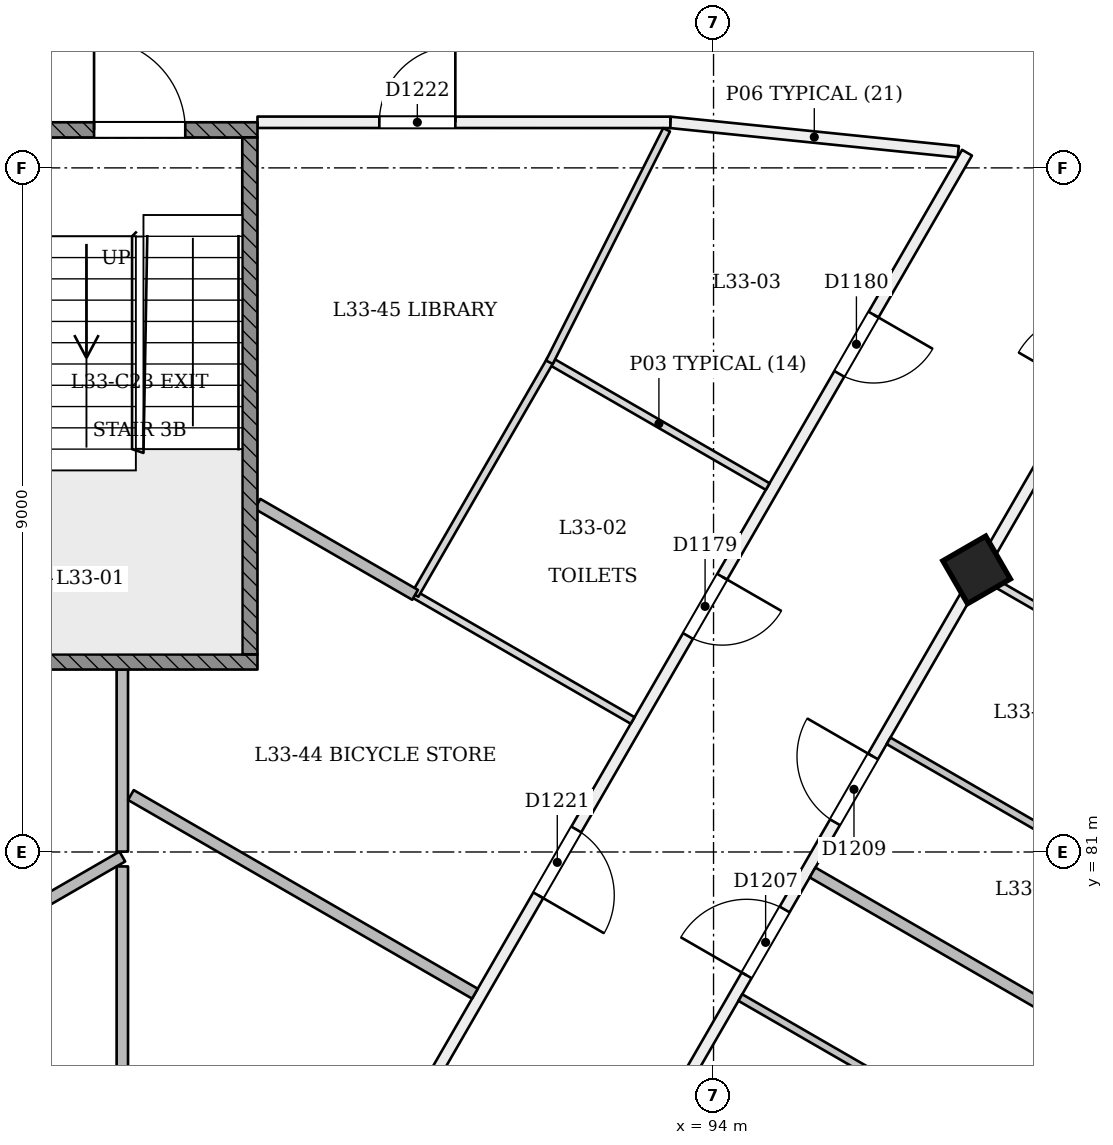
"""IFC4 building model, lengths in metres.
Left out: names, types, materials, properties, quantities, classifications, styles, units other than length and angle.
Written with IfcOpenShell. Run it as: python <this file> out.ifc"""

import sys

from ifc_helpers import new_model, si_unit, direction, frame, frame_2d, origin, origin_2d, place, context, subcontext, project, spatial, rectangle, extrude, element, fill, save


model = new_model("IFC4")
c1 = context("Model", 3, precision=1e-05, world=origin(), true_north=direction((0.0, 1.0)))
c2 = subcontext(c1, "Body", "Model", "MODEL_VIEW")
j1 = project(units=[si_unit("LENGTHUNIT", "METRE"), si_unit("PLANEANGLEUNIT", "RADIAN")], contexts=[c1])
p1 = place(None, origin())
s1 = spatial("IfcSite", under=j1, at=p1, CompositionType="ELEMENT")
p2 = place(p1, origin())
s2 = spatial("IfcBuilding", under=s1, at=p2, CompositionType="ELEMENT")
p3 = place(p2, frame((0.0, 0.0, 131.4)))
s3 = spatial("IfcBuildingStorey", under=s2, at=p3, CompositionType="ELEMENT", Elevation=131.4)
p4 = place(p3, frame((97.488, 84.664, -0.02), z_axis=(-0.02215519141, 0.038415882353, 0.999016199807), x_axis=(-0.500652777817, -0.865364161883, 0.022173483991)))
e1 = element("IfcColumn", 1, at=p4, inside=s3, PredefinedType="COLUMN", context=c2, shape_type="SweptSolid", body=[
    extrude(rectangle(XDim=0.65, YDim=0.65, at=origin_2d()), origin(), (0.0, 0.0, 1.0), 3.604),
])
p5 = place(p3, frame((93.431, 90.599, 0.0), z_axis=(0.0, 0.0, 1.0), x_axis=(0.994809932393, -0.101750667872, 0.0)))
e2 = element("IfcWall", 2, at=p5, inside=s3, PredefinedType="PARTITIONING", context=c2, shape_type="SweptSolid", body=[
    extrude(rectangle(XDim=3.808, YDim=0.15, at=frame_2d((1.904, 0.0))), origin(), (0.0, 0.0, 1.0), 3.15),
])
p6 = place(p3, frame((85.131, 63.263, 0.0), z_axis=(0.0, 0.0, 1.0), x_axis=(0.500002881847, 0.866023739943, 0.0)))
e3 = element("IfcWall", 3, at=p6, inside=s3, PredefinedType="PARTITIONING", context=c2, shape_type="SweptSolid", body=[
    extrude(rectangle(XDim=34.013, YDim=0.15, at=frame_2d((17.006, 0.0))), origin(), (0.0, 0.0, 1.0), 2.75),
])
p7 = place(p6, frame((0.351, 0.0, 0.0)))
e4 = element("IfcOpeningElement", 4, at=p7, cuts=e3, PredefinedType="OPENING", context=c2, shape_type="SweptSolid", body=[
    extrude(rectangle(XDim=1.2, YDim=2.1, at=frame_2d((0.6, 1.05))), frame((0.0, 0.085, 0.0), z_axis=(0.0, -1.0, 0.0), x_axis=(1.0, 0.0, 0.0)), (0.0, 0.0, 1.0), 0.171),
])
p8 = place(p6, frame((3.963, 0.0, 0.0)))
e5 = element("IfcOpeningElement", 5, at=p8, cuts=e3, PredefinedType="OPENING", context=c2, shape_type="SweptSolid", body=[
    extrude(rectangle(XDim=1.0, YDim=2.1, at=frame_2d((0.5, 1.05))), frame((0.0, 0.085, 0.0), z_axis=(0.0, -1.0, 0.0), x_axis=(1.0, 0.0, 0.0)), (0.0, 0.0, 1.0), 0.171),
])
p9 = place(p6, frame((9.493, 0.0, 0.0)))
e6 = element("IfcOpeningElement", 6, at=p9, cuts=e3, PredefinedType="OPENING", context=c2, shape_type="SweptSolid", body=[
    extrude(rectangle(XDim=1.0, YDim=2.1, at=frame_2d((0.5, 1.05))), frame((0.0, 0.085, 0.0), z_axis=(0.0, -1.0, 0.0), x_axis=(1.0, 0.0, 0.0)), (0.0, 0.0, 1.0), 0.171),
])
p10 = place(p6, frame((11.818, 0.0, 0.0)))
e7 = element("IfcOpeningElement", 7, at=p10, cuts=e3, PredefinedType="OPENING", context=c2, shape_type="SweptSolid", body=[
    extrude(rectangle(XDim=1.0, YDim=2.1, at=frame_2d((0.5, 1.05))), frame((0.0, 0.085, 0.0), z_axis=(0.0, -1.0, 0.0), x_axis=(1.0, 0.0, 0.0)), (0.0, 0.0, 1.0), 0.171),
])
p11 = place(p6, frame((18.608, 0.0, 0.0)))
e8 = element("IfcOpeningElement", 8, at=p11, cuts=e3, PredefinedType="OPENING", context=c2, shape_type="SweptSolid", body=[
    extrude(rectangle(XDim=1.0, YDim=2.1, at=frame_2d((0.5, 1.05))), frame((0.0, 0.085, 0.0), z_axis=(0.0, -1.0, 0.0), x_axis=(1.0, 0.0, 0.0)), (0.0, 0.0, 1.0), 0.171),
])
p12 = place(p6, frame((20.933, 0.0, 0.0)))
e9 = element("IfcOpeningElement", 9, at=p12, cuts=e3, PredefinedType="OPENING", context=c2, shape_type="SweptSolid", body=[
    extrude(rectangle(XDim=1.0, YDim=2.1, at=frame_2d((0.5, 1.05))), frame((0.0, 0.085, 0.0), z_axis=(0.0, -1.0, 0.0), x_axis=(1.0, 0.0, 0.0)), (0.0, 0.0, 1.0), 0.171),
])
p13 = place(p6, frame((27.493, 0.0, 0.0)))
e10 = element("IfcOpeningElement", 10, at=p13, cuts=e3, PredefinedType="OPENING", context=c2, shape_type="SweptSolid", body=[
    extrude(rectangle(XDim=1.0, YDim=2.1, at=frame_2d((0.5, 1.05))), frame((0.0, 0.085, 0.0), z_axis=(0.0, -1.0, 0.0), x_axis=(1.0, 0.0, 0.0)), (0.0, 0.0, 1.0), 0.171),
])
p14 = place(p6, frame((29.933, 0.0, 0.0)))
e11 = element("IfcOpeningElement", 11, at=p14, cuts=e3, PredefinedType="OPENING", context=c2, shape_type="SweptSolid", body=[
    extrude(rectangle(XDim=1.0, YDim=2.1, at=frame_2d((0.5, 1.05))), frame((0.0, 0.085, 0.0), z_axis=(0.0, -1.0, 0.0), x_axis=(1.0, 0.0, 0.0)), (0.0, 0.0, 1.0), 0.171),
])
p15 = place(p3, frame((97.335, 90.2, 0.0), z_axis=(0.0, 0.0, 1.0), x_axis=(-0.500002918398, -0.86602371884, 0.0)))
e12 = element("IfcWall", 12, at=p15, inside=s3, PredefinedType="PARTITIONING", context=c2, shape_type="SweptSolid", body=[
    extrude(rectangle(XDim=24.539, YDim=0.15, at=frame_2d((12.27, 0.0))), origin(), (0.0, 0.0, 1.0), 3.15),
])
p16 = place(p15, frame((6.442, 0.0, 0.0)))
e13 = element("IfcOpeningElement", 13, at=p16, cuts=e12, PredefinedType="OPENING", context=c2, shape_type="SweptSolid", body=[
    extrude(rectangle(XDim=0.9, YDim=2.1, at=frame_2d((0.45, 1.05))), frame((0.0, 0.085, 0.0), z_axis=(0.0, -1.0, 0.0), x_axis=(1.0, 0.0, 0.0)), (0.0, 0.0, 1.0), 0.171),
])
p17 = place(p15, frame((2.46, 0.0, 0.0)))
e14 = element("IfcOpeningElement", 14, at=p17, cuts=e12, PredefinedType="OPENING", context=c2, shape_type="SweptSolid", body=[
    extrude(rectangle(XDim=0.9, YDim=2.1, at=frame_2d((0.45, 1.05))), frame((0.0, 0.085, 0.0), z_axis=(0.0, -1.0, 0.0), x_axis=(1.0, 0.0, 0.0)), (0.0, 0.0, 1.0), 0.171),
])
p18 = place(p15, frame((15.454, 0.0, 0.0)))
e15 = element("IfcOpeningElement", 15, at=p18, cuts=e12, PredefinedType="OPENING", context=c2, shape_type="SweptSolid", body=[
    extrude(rectangle(XDim=1.0, YDim=2.1, at=frame_2d((0.5, 1.05))), frame((0.0, 0.085, 0.0), z_axis=(0.0, -1.0, 0.0), x_axis=(1.0, 0.0, 0.0)), (0.0, 0.0, 1.0), 0.171),
])
p19 = place(p15, frame((10.281, 0.0, 0.0)))
e16 = element("IfcOpeningElement", 16, at=p19, cuts=e12, PredefinedType="OPENING", context=c2, shape_type="SweptSolid", body=[
    extrude(rectangle(XDim=1.0, YDim=2.1, at=frame_2d((0.5, 1.05))), frame((0.0, 0.085, 0.0), z_axis=(0.0, -1.0, 0.0), x_axis=(1.0, 0.0, 0.0)), (0.0, 0.0, 1.0), 0.171),
])
p20 = place(p3, frame((88.0, 90.6, 0.0), z_axis=(0.0, 0.0, 1.0), x_axis=(0.999999983836, -0.000179799521, 0.0)))
e17 = element("IfcWall", 17, at=p20, inside=s3, PredefinedType="PARTITIONING", context=c2, shape_type="SweptSolid", body=[
    extrude(rectangle(XDim=5.431, YDim=0.15, at=frame_2d((2.716, 0.0))), origin(), (0.0, 0.0, 1.0), 3.15),
])
p21 = place(p20, frame((1.603, 0.0, 0.0)))
e18 = element("IfcOpeningElement", 18, at=p21, cuts=e17, PredefinedType="OPENING", context=c2, shape_type="SweptSolid", body=[
    extrude(rectangle(XDim=1.0, YDim=2.1, at=frame_2d((0.5, 1.05))), frame((0.0, 0.085, 0.0), z_axis=(0.0, -1.0, 0.0), x_axis=(1.0, 0.0, 0.0)), (0.0, 0.0, 1.0), 0.171),
])
p22 = place(p3, frame((94.712, 85.808, 0.0), z_axis=(0.0, 0.0, 1.0), x_axis=(-0.866034271106, 0.499984641034, 0.0)))
e19 = element("IfcWall", 19, at=p22, inside=s3, PredefinedType="PARTITIONING", context=c2, shape_type="SweptSolid", body=[
    extrude(rectangle(XDim=3.305, YDim=0.1, at=frame_2d((1.652, 0.0))), origin(), (0.0, 0.0, 1.0), 3.15),
])
p23 = place(p3, frame((90.056, 84.393, 0.0), z_axis=(0.0, 0.0, 1.0), x_axis=(0.866002163101, -0.500040251884, 0.0)))
e20 = element("IfcWall", 20, at=p23, inside=s3, PredefinedType="PARTITIONING", context=c2, shape_type="SweptSolid", body=[
    extrude(rectangle(XDim=3.325, YDim=0.1, at=frame_2d((1.663, 0.0))), origin(), (0.0, 0.0, 1.0), 3.15),
])
p24 = place(p3, frame((91.859, 87.478, 0.0), z_axis=(0.0, 0.0, 1.0), x_axis=(-0.499740198564, -0.866175348263, 0.0)))
e21 = element("IfcWall", 21, at=p24, inside=s3, PredefinedType="PARTITIONING", context=c2, shape_type="SweptSolid", body=[
    extrude(rectangle(XDim=3.573, YDim=0.1, at=frame_2d((1.787, 0.0))), origin(), (0.0, 0.0, 1.0), 3.15),
])
p25 = place(p3, frame((93.382, 90.501, 0.0), z_axis=(0.0, 0.0, 1.0), x_axis=(-0.450176199903, -0.89293974547, 0.0)))
e22 = element("IfcWall", 22, at=p25, inside=s3, PredefinedType="PARTITIONING", context=c2, shape_type="SweptSolid", body=[
    extrude(rectangle(XDim=3.425, YDim=0.1, at=frame_2d((1.713, 0.0))), origin(), (0.0, 0.0, 1.0), 3.15),
])
p26 = place(p3, frame((94.353, 79.085, 0.0), z_axis=(0.0, 0.0, 1.0), x_axis=(0.86601045545, -0.500025890382, 0.0)))
e23 = element("IfcWall", 23, at=p26, inside=s3, PredefinedType="PARTITIONING", context=c2, shape_type="SweptSolid", body=[
    extrude(rectangle(XDim=2.925, YDim=0.1, at=frame_2d((1.462, 0.0))), origin(), (0.0, 0.0, 1.0), 3.15),
])
p27 = place(p3, frame((100.798, 77.558, 0.0), z_axis=(0.0, 0.0, 1.0), x_axis=(-0.866025401434, 0.500000004071, 0.0)))
e24 = element("IfcWall", 24, at=p27, inside=s3, PredefinedType="PARTITIONING", context=c2, shape_type="SweptSolid", body=[
    extrude(rectangle(XDim=6.345, YDim=0.15, at=frame_2d((3.173, 0.0))), origin(), (0.0, 0.0, 1.0), 2.65),
])
p28 = place(p3, frame((98.749, 81.05, 0.0), z_axis=(0.0, 0.0, 1.0), x_axis=(-0.865989837833, 0.500061596976, 0.0)))
e25 = element("IfcWall", 25, at=p28, inside=s3, PredefinedType="PARTITIONING", context=c2, shape_type="SweptSolid", body=[
    extrude(rectangle(XDim=2.825, YDim=0.1, at=frame_2d((1.413, 0.0))), origin(), (0.0, 0.0, 1.0), 3.15),
])
p29 = place(p3, frame((99.956, 83.24, 0.0), z_axis=(0.0, 0.0, 1.0), x_axis=(-0.866020020486, 0.50000932403, 0.0)))
e26 = element("IfcWall", 26, at=p29, inside=s3, PredefinedType="PARTITIONING", context=c2, shape_type="SweptSolid", body=[
    extrude(rectangle(XDim=2.775, YDim=0.1, at=frame_2d((1.387, 0.0))), origin(), (0.0, 0.0, 1.0), 2.75),
])
p30 = place(p3, frame((80.129, 77.422, 0.0), z_axis=(0.0, 0.0, 1.0), x_axis=(0.866030712881, 0.499990804263, 0.0)))
e27 = element("IfcWall", 27, at=p30, inside=s3, PredefinedType="PARTITIONING", context=c2, shape_type="SweptSolid", body=[
    extrude(rectangle(XDim=7.035, YDim=0.15, at=frame_2d((3.518, 0.0))), origin(), (0.0, 0.0, 1.0), 3.15),
])
p31 = place(p3, frame((86.222, 81.005, 0.0), z_axis=(0.0, 0.0, 1.0), x_axis=(0.0, 1.0, 0.0)))
e28 = element("IfcWall", 28, at=p31, inside=s3, PredefinedType="PARTITIONING", context=c2, shape_type="SweptSolid", body=[
    extrude(rectangle(XDim=2.395, YDim=0.15, at=frame_2d((1.198, 0.0))), origin(), (0.0, 0.0, 1.0), 3.15),
])
p32 = place(p3, frame((86.222, 80.81, 0.0), z_axis=(0.0, 0.0, 1.0), x_axis=(0.0, -1.0, 0.0)))
e29 = element("IfcWall", 29, at=p32, inside=s3, PredefinedType="PARTITIONING", context=c2, shape_type="SweptSolid", body=[
    extrude(rectangle(XDim=4.734, YDim=0.15, at=frame_2d((2.367, 0.0))), origin(), (0.0, 0.0, 1.0), 3.15),
])
p33 = place(p3, frame((90.86, 79.136, 0.0), z_axis=(0.0, 0.0, 1.0), x_axis=(-0.866023771128, 0.500002827834, 0.0)))
e30 = element("IfcWall", 30, at=p33, inside=s3, PredefinedType="PARTITIONING", context=c2, shape_type="SweptSolid", body=[
    extrude(rectangle(XDim=5.226, YDim=0.15, at=frame_2d((2.613, 0.0))), origin(), (0.0, 0.0, 1.0), 3.15),
])
p34 = place(p3, frame((90.073, 84.383, 0.0), z_axis=(0.0, 0.0, 1.0), x_axis=(-0.866044647487, 0.499966667447, 0.0)))
e31 = element("IfcWall", 31, at=p34, inside=s3, PredefinedType="PARTITIONING", context=c2, shape_type="SweptSolid", body=[
    extrude(rectangle(XDim=2.394, YDim=0.15, at=frame_2d((1.197, 0.0))), origin(), (0.0, 0.0, 1.0), 3.15),
])
p35 = place(p3, frame((82.0, 90.5, 0.0), z_axis=(0.0, 0.0, 1.0), x_axis=(1.0, 0.0, 0.0)))
e32 = element("IfcWall", 32, at=p35, inside=s3, PredefinedType="SOLIDWALL", context=c2, shape_type="SweptSolid", body=[
    extrude(rectangle(XDim=6.0, YDim=0.2, at=frame_2d((3.0, 0.0))), origin(), (0.0, 0.0, 1.0), 3.15),
])
p36 = place(p35, frame((0.95, 0.0, 0.0)))
e33 = element("IfcOpeningElement", 33, at=p36, cuts=e32, PredefinedType="OPENING", context=c2, shape_type="SweptSolid", body=[
    extrude(rectangle(XDim=1.2, YDim=2.1, at=frame_2d((0.6, 1.05))), frame((0.0, 0.11, 0.0), z_axis=(0.0, -1.0, 0.0), x_axis=(1.0, 0.0, 0.0)), (0.0, 0.0, 1.0), 0.221),
])
p37 = place(p35, frame((3.85, 0.0, 0.0)))
e34 = element("IfcOpeningElement", 34, at=p37, cuts=e32, PredefinedType="OPENING", context=c2, shape_type="SweptSolid", body=[
    extrude(rectangle(XDim=1.2, YDim=2.1, at=frame_2d((0.6, 1.05))), frame((0.0, 0.11, 0.0), z_axis=(0.0, -1.0, 0.0), x_axis=(1.0, 0.0, 0.0)), (0.0, 0.0, 1.0), 0.221),
])
p38 = place(p3, frame((82.0, 83.5, 0.0), z_axis=(0.0, 0.0, 1.0), x_axis=(1.0, 0.0, 0.0)))
e35 = element("IfcWall", 35, at=p38, inside=s3, PredefinedType="SOLIDWALL", context=c2, shape_type="SweptSolid", body=[
    extrude(rectangle(XDim=6.0, YDim=0.2, at=frame_2d((3.0, 0.0))), origin(), (0.0, 0.0, 1.0), 3.15),
])
p39 = place(p3, frame((87.9, 83.6, 0.0), z_axis=(0.0, 0.0, 1.0), x_axis=(0.0, 1.0, 0.0)))
e36 = element("IfcWall", 36, at=p39, inside=s3, PredefinedType="SOLIDWALL", context=c2, shape_type="SweptSolid", body=[
    extrude(rectangle(XDim=6.8, YDim=0.2, at=frame_2d((3.4, 0.0))), origin(), (0.0, 0.0, 1.0), 3.15),
])
p40 = place(p16, origin())
e37 = element("IfcDoor", 37, at=p40, inside=s3, OperationType="SINGLE_SWING_LEFT", PredefinedType="NOTDEFINED", context=c2, shape_type="SweptSolid", body=[
    extrude(rectangle(XDim=0.9, YDim=2.1, at=frame_2d((0.45, 1.05))), frame((0.0, 0.025, 0.0), z_axis=(0.0, -1.0, 0.0), x_axis=(1.0, 0.0, 0.0)), (0.0, 0.0, 1.0), 0.05),
])
fill(e13, e37)
p41 = place(p17, origin())
e38 = element("IfcDoor", 38, at=p41, inside=s3, OperationType="SINGLE_SWING_LEFT", PredefinedType="NOTDEFINED", context=c2, shape_type="SweptSolid", body=[
    extrude(rectangle(XDim=0.9, YDim=2.1, at=frame_2d((0.45, 1.05))), frame((0.0, 0.025, 0.0), z_axis=(0.0, -1.0, 0.0), x_axis=(1.0, 0.0, 0.0)), (0.0, 0.0, 1.0), 0.05),
])
fill(e14, e38)
p42 = place(p11, origin())
e39 = element("IfcDoor", 39, at=p42, inside=s3, OperationType="SINGLE_SWING_LEFT", PredefinedType="NOTDEFINED", context=c2, shape_type="SweptSolid", body=[
    extrude(rectangle(XDim=1.0, YDim=2.1, at=frame_2d((0.5, 1.05))), frame((0.0, 0.025, 0.0), z_axis=(0.0, -1.0, 0.0), x_axis=(1.0, 0.0, 0.0)), (0.0, 0.0, 1.0), 0.05),
])
fill(e8, e39)
p43 = place(p12, origin())
e40 = element("IfcDoor", 40, at=p43, inside=s3, OperationType="SINGLE_SWING_RIGHT", PredefinedType="NOTDEFINED", context=c2, shape_type="SweptSolid", body=[
    extrude(rectangle(XDim=1.0, YDim=2.1, at=frame_2d((0.5, 1.05))), frame((0.0, 0.025, 0.0), z_axis=(0.0, -1.0, 0.0), x_axis=(1.0, 0.0, 0.0)), (0.0, 0.0, 1.0), 0.05),
])
fill(e9, e40)
p44 = place(p19, origin())
e41 = element("IfcDoor", 41, at=p44, inside=s3, OperationType="SINGLE_SWING_RIGHT", PredefinedType="NOTDEFINED", context=c2, shape_type="SweptSolid", body=[
    extrude(rectangle(XDim=1.0, YDim=2.1, at=frame_2d((0.5, 1.05))), frame((0.0, 0.025, 0.0), z_axis=(0.0, -1.0, 0.0), x_axis=(1.0, 0.0, 0.0)), (0.0, 0.0, 1.0), 0.05),
])
fill(e16, e41)
p45 = place(p21, origin())
e42 = element("IfcDoor", 42, at=p45, inside=s3, OperationType="SINGLE_SWING_RIGHT", PredefinedType="NOTDEFINED", context=c2, shape_type="SweptSolid", body=[
    extrude(rectangle(XDim=1.0, YDim=2.1, at=frame_2d((0.5, 1.05))), frame((0.0, 0.025, 0.0), z_axis=(0.0, -1.0, 0.0), x_axis=(1.0, 0.0, 0.0)), (0.0, 0.0, 1.0), 0.05),
])
fill(e18, e42)
p46 = place(p37, origin())
e43 = element("IfcDoor", 43, at=p46, inside=s3, OperationType="SINGLE_SWING_LEFT", PredefinedType="NOTDEFINED", context=c2, shape_type="SweptSolid", body=[
    extrude(rectangle(XDim=1.2, YDim=2.1, at=frame_2d((0.6, 1.05))), frame((0.0, 0.025, 0.0), z_axis=(0.0, -1.0, 0.0), x_axis=(1.0, 0.0, 0.0)), (0.0, 0.0, 1.0), 0.05),
])
fill(e34, e43)
save(model, sys.argv[1])
